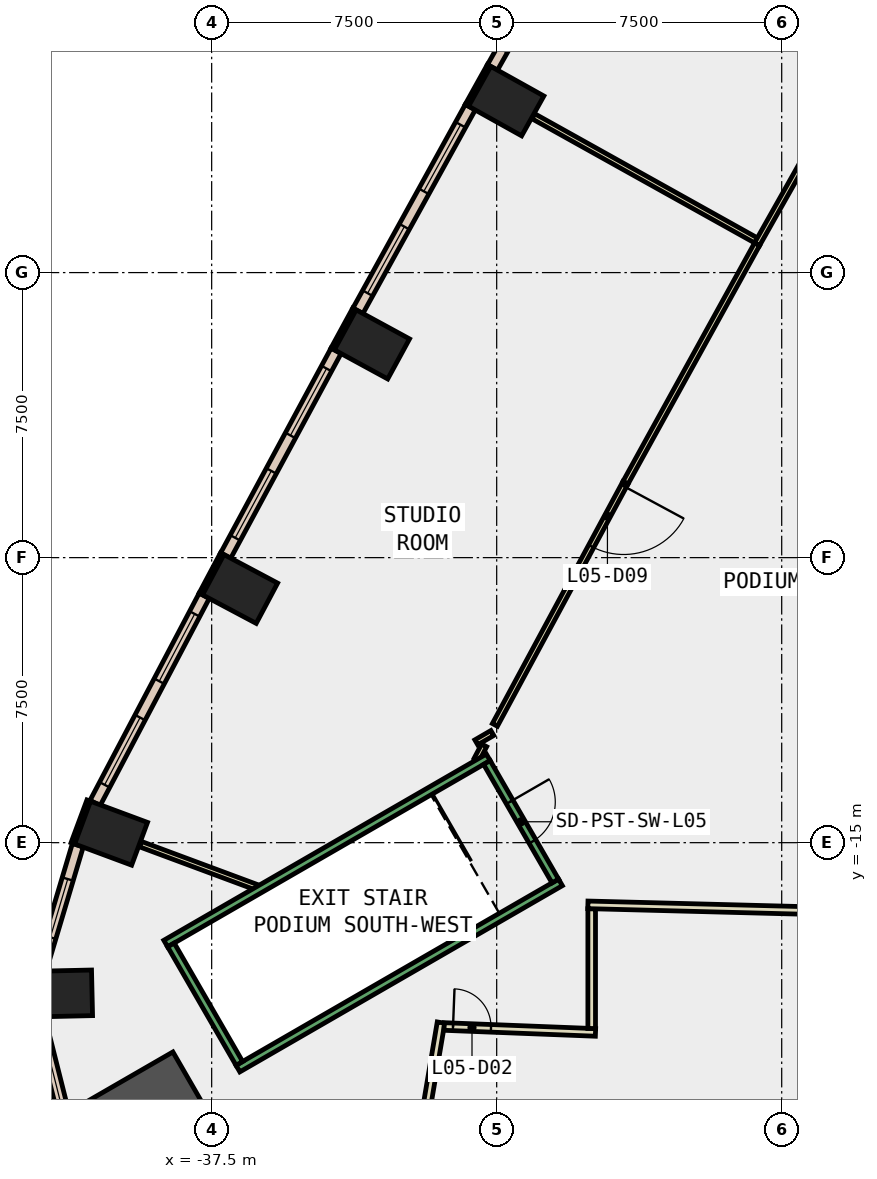
"""IFC4 building model, lengths in metres.
Left out: names, types, materials, properties, quantities, classifications, styles, units other than length and angle.
Written with IfcOpenShell. Run it as: python <this file> out.ifc"""

import sys

from ifc_helpers import new_model, si_unit, direction, frame, frame_2d, origin, origin_2d, place, context, subcontext, project, spatial, rectangle, extrude, element, fill, save


model = new_model("IFC4")
c1 = context("Model", 3, precision=1e-05, world=origin(), true_north=direction((0.0, 1.0)))
c2 = subcontext(c1, "Body", "Model", "MODEL_VIEW")
j1 = project(units=[si_unit("LENGTHUNIT", "METRE"), si_unit("PLANEANGLEUNIT", "RADIAN")], contexts=[c1])
p1 = place(None, origin())
s1 = spatial("IfcSite", under=j1, at=p1, CompositionType="ELEMENT")
p2 = place(p1, origin())
s2 = spatial("IfcBuilding", under=s1, at=p2, CompositionType="ELEMENT")
p3 = place(p2, frame((0.0, 0.0, 30.0)))
s3 = spatial("IfcBuildingStorey", under=s2, at=p3, CompositionType="ELEMENT", Elevation=30.0)
for number, where, z_axis, x_axis in (
    (1, (-29.75, 4.512, -0.45), (0.0, 0.0, 1.0), (0.487, 0.873, 0.0)),
    (2, (-33.283, -1.889, -0.45), (0.0, 0.0, 1.0), (0.478, 0.878, 0.0)),
    (3, (-36.753, -8.325, -0.45), (0.0, 0.0, 1.0), (0.469, 0.883, 0.0)),
    (4, (-40.147, -14.751, -0.45), (0.0, 0.0, 1.0), (0.348, 0.937, 0.0)),
    (5, (-41.448, -18.969, -0.45), (0.0, 0.0, 1.0), (-0.023, 1.0, 0.0)),
):
    element("IfcColumn", number, at=place(p3, frame(where, z_axis=z_axis, x_axis=x_axis)), inside=s3, PredefinedType="COLUMN", context=c2, shape_type="SweptSolid", body=[
        extrude(rectangle(XDim=1.2, YDim=1.6, at=origin_2d()), origin(), (0.0, 0.0, 1.0), 4.85),
    ])
p4 = place(p3, frame((-39.069, -22.556, -0.45), z_axis=(0.0, 0.0, 1.0), x_axis=(0.866025403784, 0.5, 0.0)))
e6 = element("IfcColumn", 6, at=p4, inside=s3, PredefinedType="COLUMN", context=c2, shape_type="SweptSolid", body=[
    extrude(rectangle(XDim=3.0, YDim=3.0, at=origin_2d()), origin(), (0.0, 0.0, 1.0), 4.85),
])
p5 = place(p3, frame((-30.2, 5.45, 0.0), z_axis=(0.0, 0.0, 1.0), x_axis=(-0.486817526853, -0.873503689488, 0.0)))
e7 = element("IfcWall", 7, at=p5, inside=s3, PredefinedType="STANDARD", context=c2, shape_type="SweptSolid", body=[
    extrude(rectangle(XDim=1.2, YDim=0.1, at=frame_2d((0.6, 0.0))), origin(), (0.0, 0.0, 1.0), 4.4),
])
p6 = place(p3, frame((-33.742, -0.956, 0.0), z_axis=(0.0, 0.0, 1.0), x_axis=(-0.478267644701, -0.878214131082, 0.0)))
e8 = element("IfcWall", 8, at=p6, inside=s3, PredefinedType="STANDARD", context=c2, shape_type="SweptSolid", body=[
    extrude(rectangle(XDim=1.2, YDim=0.1, at=frame_2d((0.6, 0.0))), origin(), (0.0, 0.0, 1.0), 4.4),
])
p7 = place(p3, frame((-37.222, -7.397, 0.0), z_axis=(0.0, 0.0, 1.0), x_axis=(-0.469383408131, -0.882994459876, 0.0)))
e9 = element("IfcWall", 9, at=p7, inside=s3, PredefinedType="STANDARD", context=c2, shape_type="SweptSolid", body=[
    extrude(rectangle(XDim=1.199, YDim=0.1, at=frame_2d((0.6, 0.0))), origin(), (0.0, 0.0, 1.0), 4.4),
])
p8 = place(p3, frame((-40.735, -13.893, 0.0), z_axis=(0.0, 0.0, 1.0), x_axis=(-0.348268249601, -0.937394914814, 0.0)))
e10 = element("IfcWall", 10, at=p8, inside=s3, PredefinedType="STANDARD", context=c2, shape_type="SweptSolid", body=[
    extrude(rectangle(XDim=1.2, YDim=0.1, at=frame_2d((0.6, 0.0))), origin(), (0.0, 0.0, 1.0), 4.4),
])
p9 = place(p3, frame((-27.101, 10.73, 0.0), z_axis=(0.0, 0.0, 1.0), x_axis=(-0.491661677717, -0.870786308267, 0.0)))
e11 = element("IfcWall", 11, at=p9, inside=s3, PredefinedType="STANDARD", context=c2, shape_type="SweptSolid", body=[
    extrude(rectangle(XDim=6.122, YDim=0.3, at=frame_2d((3.061, 0.0))), origin(), (0.0, 0.0, 1.0), 4.4),
])
p10 = place(p9, frame((0.531, 0.0, 1.0)))
e12 = element("IfcOpeningElement", 12, at=p10, cuts=e11, PredefinedType="OPENING", context=c2, shape_type="SweptSolid", body=[
    extrude(rectangle(XDim=2.0, YDim=3.2, at=frame_2d((1.0, 1.6))), frame((0.0, 0.16, 0.0), z_axis=(0.0, -1.0, 0.0), x_axis=(1.0, 0.0, 0.0)), (0.0, 0.0, 1.0), 0.32),
])
p11 = place(p9, frame((3.592, 0.0, 1.0)))
e13 = element("IfcOpeningElement", 13, at=p11, cuts=e11, PredefinedType="OPENING", context=c2, shape_type="SweptSolid", body=[
    extrude(rectangle(XDim=2.0, YDim=3.2, at=frame_2d((1.0, 1.6))), frame((0.0, 0.16, 0.0), z_axis=(0.0, -1.0, 0.0), x_axis=(1.0, 0.0, 0.0)), (0.0, 0.0, 1.0), 0.32),
])
p12 = place(p3, frame((-30.694, 4.353, 0.0), z_axis=(0.0, 0.0, 1.0), x_axis=(-0.483233380559, -0.875491576152, 0.0)))
e14 = element("IfcWall", 14, at=p12, inside=s3, PredefinedType="STANDARD", context=c2, shape_type="SweptSolid", body=[
    extrude(rectangle(XDim=6.121, YDim=0.3, at=frame_2d((3.061, 0.0))), origin(), (0.0, 0.0, 1.0), 4.4),
])
p13 = place(p12, frame((0.53, 0.0, 1.0)))
e15 = element("IfcOpeningElement", 15, at=p13, cuts=e14, PredefinedType="OPENING", context=c2, shape_type="SweptSolid", body=[
    extrude(rectangle(XDim=2.0, YDim=3.2, at=frame_2d((1.0, 1.6))), frame((0.0, 0.16, 0.0), z_axis=(0.0, -1.0, 0.0), x_axis=(1.0, 0.0, 0.0)), (0.0, 0.0, 1.0), 0.32),
])
p14 = place(p12, frame((3.591, 0.0, 1.0)))
e16 = element("IfcOpeningElement", 16, at=p14, cuts=e14, PredefinedType="OPENING", context=c2, shape_type="SweptSolid", body=[
    extrude(rectangle(XDim=2.0, YDim=3.2, at=frame_2d((1.0, 1.6))), frame((0.0, 0.16, 0.0), z_axis=(0.0, -1.0, 0.0), x_axis=(1.0, 0.0, 0.0)), (0.0, 0.0, 1.0), 0.32),
])
p15 = place(p3, frame((-34.226, -2.058, 0.0), z_axis=(0.0, 0.0, 1.0), x_axis=(-0.474584950749, -0.880209704856, 0.0)))
e17 = element("IfcWall", 17, at=p15, inside=s3, PredefinedType="STANDARD", context=c2, shape_type="SweptSolid", body=[
    extrude(rectangle(XDim=6.121, YDim=0.3, at=frame_2d((3.061, 0.0))), origin(), (0.0, 0.0, 1.0), 4.4),
])
p16 = place(p15, frame((0.53, 0.0, 1.0)))
e18 = element("IfcOpeningElement", 18, at=p16, cuts=e17, PredefinedType="OPENING", context=c2, shape_type="SweptSolid", body=[
    extrude(rectangle(XDim=2.0, YDim=3.2, at=frame_2d((1.0, 1.6))), frame((0.0, 0.16, 0.0), z_axis=(0.0, -1.0, 0.0), x_axis=(1.0, 0.0, 0.0)), (0.0, 0.0, 1.0), 0.32),
])
p17 = place(p15, frame((3.591, 0.0, 1.0)))
e19 = element("IfcOpeningElement", 19, at=p17, cuts=e17, PredefinedType="OPENING", context=c2, shape_type="SweptSolid", body=[
    extrude(rectangle(XDim=2.0, YDim=3.2, at=frame_2d((1.0, 1.6))), frame((0.0, 0.16, 0.0), z_axis=(0.0, -1.0, 0.0), x_axis=(1.0, 0.0, 0.0)), (0.0, 0.0, 1.0), 0.32),
])
p18 = place(p3, frame((-37.695, -8.503, 0.0), z_axis=(0.0, 0.0, 1.0), x_axis=(-0.466125129602, -0.884718804792, 0.0)))
e20 = element("IfcWall", 20, at=p18, inside=s3, PredefinedType="STANDARD", context=c2, shape_type="SweptSolid", body=[
    extrude(rectangle(XDim=6.164, YDim=0.3, at=frame_2d((3.082, 0.0))), origin(), (0.0, 0.0, 1.0), 4.4),
])
p19 = place(p18, frame((0.541, 0.0, 1.0)))
e21 = element("IfcOpeningElement", 21, at=p19, cuts=e20, PredefinedType="OPENING", context=c2, shape_type="SweptSolid", body=[
    extrude(rectangle(XDim=2.0, YDim=3.2, at=frame_2d((1.0, 1.6))), frame((0.0, 0.16, 0.0), z_axis=(0.0, -1.0, 0.0), x_axis=(1.0, 0.0, 0.0)), (0.0, 0.0, 1.0), 0.32),
])
p20 = place(p18, frame((3.623, 0.0, 1.0)))
e22 = element("IfcOpeningElement", 22, at=p20, cuts=e20, PredefinedType="OPENING", context=c2, shape_type="SweptSolid", body=[
    extrude(rectangle(XDim=2.0, YDim=3.2, at=frame_2d((1.0, 1.6))), frame((0.0, 0.16, 0.0), z_axis=(0.0, -1.0, 0.0), x_axis=(1.0, 0.0, 0.0)), (0.0, 0.0, 1.0), 0.32),
])
p21 = place(p3, frame((-41.022, -15.066, 0.0), z_axis=(0.0, 0.0, 1.0), x_axis=(-0.285800575124, -0.958289116738, 0.0)))
e23 = element("IfcWall", 23, at=p21, inside=s3, PredefinedType="STANDARD", context=c2, shape_type="SweptSolid", body=[
    extrude(rectangle(XDim=3.46, YDim=0.3, at=frame_2d((1.73, 0.0))), origin(), (0.0, 0.0, 1.0), 4.4),
])
p22 = place(p21, frame((0.93, 0.0, 1.0)))
e24 = element("IfcOpeningElement", 24, at=p22, cuts=e23, PredefinedType="OPENING", context=c2, shape_type="SweptSolid", body=[
    extrude(rectangle(XDim=1.6, YDim=3.2, at=frame_2d((0.8, 1.6))), frame((0.0, 0.16, 0.0), z_axis=(0.0, -1.0, 0.0), x_axis=(1.0, 0.0, 0.0)), (0.0, 0.0, 1.0), 0.32),
])
p23 = place(p3, frame((-42.044, -19.581, 0.0), z_axis=(0.0, 0.0, 1.0), x_axis=(0.244315836028, -0.969695711172, 0.0)))
e25 = element("IfcWall", 25, at=p23, inside=s3, PredefinedType="STANDARD", context=c2, shape_type="SweptSolid", body=[
    extrude(rectangle(XDim=3.291, YDim=0.3, at=frame_2d((1.645, 0.0))), origin(), (0.0, 0.0, 1.0), 4.4),
])
p24 = place(p23, frame((0.845, 0.0, 1.0)))
e26 = element("IfcOpeningElement", 26, at=p24, cuts=e25, PredefinedType="OPENING", context=c2, shape_type="SweptSolid", body=[
    extrude(rectangle(XDim=1.6, YDim=3.2, at=frame_2d((0.8, 1.6))), frame((0.0, 0.16, 0.0), z_axis=(0.0, -1.0, 0.0), x_axis=(1.0, 0.0, 0.0)), (0.0, 0.0, 1.0), 0.32),
])
p25 = place(p3, frame((-32.625, -26.588, 0.0), z_axis=(0.0, 0.0, 1.0), x_axis=(0.166858828969, 0.985980796565, 0.0)))
e27 = element("IfcWall", 27, at=p25, inside=s3, PredefinedType="PARTITIONING", context=c2, shape_type="SweptSolid", body=[
    extrude(rectangle(XDim=6.951, YDim=0.2, at=frame_2d((3.476, 0.0))), origin(), (0.0, 0.0, 1.0), 4.4),
])
p26 = place(p3, frame((-31.382, -19.837, 0.0), z_axis=(0.0, 0.0, 1.0), x_axis=(0.999233502058, -0.03914598785, 0.0)))
e28 = element("IfcWall", 28, at=p26, inside=s3, PredefinedType="PARTITIONING", context=c2, shape_type="SweptSolid", body=[
    extrude(rectangle(XDim=3.985, YDim=0.2, at=frame_2d((1.993, 0.0))), origin(), (0.0, 0.0, 1.0), 4.4),
])
p27 = place(p26, frame((0.233, 0.0, 0.0)))
e29 = element("IfcOpeningElement", 29, at=p27, cuts=e28, PredefinedType="OPENING", context=c2, shape_type="SweptSolid", body=[
    extrude(rectangle(XDim=1.0, YDim=2.1, at=frame_2d((0.5, 1.05))), frame((0.0, 0.11, 0.0), z_axis=(0.0, -1.0, 0.0), x_axis=(1.0, 0.0, 0.0)), (0.0, 0.0, 1.0), 0.22),
])
p28 = place(p3, frame((-27.5, -19.889, 0.0), z_axis=(0.0, 0.0, 1.0), x_axis=(0.0, 1.0, 0.0)))
e30 = element("IfcWall", 30, at=p28, inside=s3, PredefinedType="PARTITIONING", context=c2, shape_type="SweptSolid", body=[
    extrude(rectangle(XDim=3.15, YDim=0.2, at=frame_2d((1.575, 0.0))), origin(), (0.0, 0.0, 1.0), 4.4),
])
p29 = place(p3, frame((-27.6, -16.636, 0.0), z_axis=(0.0, 0.0, 1.0), x_axis=(0.999664659407, -0.025895341927, 0.0)))
e31 = element("IfcWall", 31, at=p29, inside=s3, PredefinedType="PARTITIONING", context=c2, shape_type="SweptSolid", body=[
    extrude(rectangle(XDim=8.881, YDim=0.2, at=frame_2d((4.44, 0.0))), origin(), (0.0, 0.0, 1.0), 4.4),
])
p30 = place(p3, frame((-23.112, 0.811, 0.0), z_axis=(0.0, 0.0, 1.0), x_axis=(-0.873400397497, 0.487002818937, 0.0)))
e32 = element("IfcWall", 32, at=p30, inside=s3, PredefinedType="PARTITIONING", context=c2, shape_type="SweptSolid", body=[
    extrude(rectangle(XDim=6.78, YDim=0.15, at=frame_2d((3.39, 0.0))), origin(), (0.0, 0.0, 1.0), 4.4),
])
p31 = place(p3, frame((-19.555, 7.112, 0.0), z_axis=(0.0, 0.0, 1.0), x_axis=(-0.491625820386, -0.87080655299, 0.0)))
e33 = element("IfcWall", 33, at=p31, inside=s3, PredefinedType="PARTITIONING", context=c2, shape_type="SweptSolid", body=[
    extrude(rectangle(XDim=7.311, YDim=0.15, at=frame_2d((3.655, 0.0))), origin(), (0.0, 0.0, 1.0), 4.4),
])
p32 = place(p3, frame((-23.148, 0.746, 0.0), z_axis=(0.0, 0.0, 1.0), x_axis=(-0.483125061868, -0.875551354631, 0.0)))
e34 = element("IfcWall", 34, at=p32, inside=s3, PredefinedType="PARTITIONING", context=c2, shape_type="SweptSolid", body=[
    extrude(rectangle(XDim=7.168, YDim=0.15, at=frame_2d((3.584, 0.0))), origin(), (0.0, 0.0, 1.0), 4.4),
])
p33 = place(p3, frame((-26.611, -5.53, 0.0), z_axis=(0.0, 0.0, 1.0), x_axis=(-0.474697082426, -0.88014923731, 0.0)))
e35 = element("IfcWall", 35, at=p33, inside=s3, PredefinedType="PARTITIONING", context=c2, shape_type="SweptSolid", body=[
    extrude(rectangle(XDim=7.238, YDim=0.15, at=frame_2d((3.619, 0.0))), origin(), (0.0, 0.0, 1.0), 4.4),
])
p34 = place(p33, frame((0.1, 0.0, 0.0)))
e36 = element("IfcOpeningElement", 36, at=p34, cuts=e35, PredefinedType="OPENING", context=c2, shape_type="SweptSolid", body=[
    extrude(rectangle(XDim=1.8, YDim=2.1, at=frame_2d((0.9, 1.05))), frame((0.0, 0.085, 0.0), z_axis=(0.0, -1.0, 0.0), x_axis=(1.0, 0.0, 0.0)), (0.0, 0.0, 1.0), 0.17),
])
p35 = place(p3, frame((-30.115, -12.115, 0.0), z_axis=(0.0, 0.0, 1.0), x_axis=(-0.864774934036, -0.502159649377, 0.0)))
e37 = element("IfcWall", 37, at=p35, inside=s3, PredefinedType="PARTITIONING", context=c2, shape_type="SweptSolid", body=[
    extrude(rectangle(XDim=0.488, YDim=0.15, at=frame_2d((0.244, 0.0))), origin(), (0.0, 0.0, 1.0), 4.4),
])
p36 = place(p3, frame((-30.33, -12.44, 0.0), z_axis=(0.0, 0.0, 1.0), x_axis=(-0.465959538506, -0.884806028729, 0.0)))
e38 = element("IfcWall", 38, at=p36, inside=s3, PredefinedType="PARTITIONING", context=c2, shape_type="SweptSolid", body=[
    extrude(rectangle(XDim=0.425, YDim=0.15, at=frame_2d((0.212, 0.0))), origin(), (0.0, 0.0, 1.0), 4.4),
])
p37 = place(p3, frame((-36.334, -16.168, 0.0), z_axis=(0.0, 0.0, 1.0), x_axis=(-0.937400028274, 0.348254485961, 0.0)))
e39 = element("IfcWall", 39, at=p37, inside=s3, PredefinedType="PARTITIONING", context=c2, shape_type="SweptSolid", body=[
    extrude(rectangle(XDim=3.247, YDim=0.15, at=frame_2d((1.624, 0.0))), origin(), (0.0, 0.0, 1.0), 4.4),
])
for number, where, z_axis, x_axis in (
    (40, (-30.222, -12.755, 0.0), (0.0, 0.0, 1.0), (-0.866, -0.5, 0.0)),
    (41, (-28.322, -16.045, 0.0), (0.0, 0.0, 1.0), (-0.866, -0.5, 0.0)),
):
    element("IfcWall", number, at=place(p3, frame(where, z_axis=z_axis, x_axis=x_axis)), inside=s3, PredefinedType="STANDARD", context=c2, shape_type="SweptSolid", body=[
        extrude(rectangle(XDim=9.8, YDim=0.2, at=frame_2d((4.9, 0.0))), origin(), (0.0, 0.0, 1.0), 3.2),
    ])
p38 = place(p3, frame((-30.258, -12.891, 0.0), z_axis=(0.0, 0.0, 1.0), x_axis=(0.499982693035, -0.866035395735, 0.0)))
e42 = element("IfcWall", 42, at=p38, inside=s3, PredefinedType="STANDARD", context=c2, shape_type="SweptSolid", body=[
    extrude(rectangle(XDim=3.6, YDim=0.2, at=frame_2d((1.8, 0.0))), origin(), (0.0, 0.0, 1.0), 3.2),
])
p39 = place(p38, frame((1.2, 0.0, 0.0)))
e43 = element("IfcOpeningElement", 43, at=p39, cuts=e42, PredefinedType="OPENING", context=c2, shape_type="SweptSolid", body=[
    extrude(rectangle(XDim=1.2, YDim=2.2, at=frame_2d((0.6, 1.1))), frame((0.0, 0.11, 0.0), z_axis=(0.0, -1.0, 0.0), x_axis=(1.0, 0.0, 0.0)), (0.0, 0.0, 1.0), 0.22),
])
p40 = place(p3, frame((-38.572, -17.691, 0.0), z_axis=(0.0, 0.0, 1.0), x_axis=(0.49995333141, -0.866052346231, 0.0)))
e44 = element("IfcWall", 44, at=p40, inside=s3, PredefinedType="STANDARD", context=c2, shape_type="SweptSolid", body=[
    extrude(rectangle(XDim=3.6, YDim=0.2, at=frame_2d((1.8, 0.0))), origin(), (0.0, 0.0, 1.0), 3.2),
])
p41 = place(p13, origin())
e45 = element("IfcWindow", 45, at=p41, inside=s3, PartitioningType="SINGLE_PANEL", PredefinedType="WINDOW", context=c2, shape_type="SweptSolid", body=[
    extrude(rectangle(XDim=2.0, YDim=3.2, at=frame_2d((1.0, 1.6))), frame((0.0, 0.03, 0.0), z_axis=(0.0, -1.0, 0.0), x_axis=(1.0, 0.0, 0.0)), (0.0, 0.0, 1.0), 0.06),
])
fill(e15, e45)
p42 = place(p14, origin())
e46 = element("IfcWindow", 46, at=p42, inside=s3, PartitioningType="SINGLE_PANEL", PredefinedType="WINDOW", context=c2, shape_type="SweptSolid", body=[
    extrude(rectangle(XDim=2.0, YDim=3.2, at=frame_2d((1.0, 1.6))), frame((0.0, 0.03, 0.0), z_axis=(0.0, -1.0, 0.0), x_axis=(1.0, 0.0, 0.0)), (0.0, 0.0, 1.0), 0.06),
])
fill(e16, e46)
p43 = place(p16, origin())
e47 = element("IfcWindow", 47, at=p43, inside=s3, PartitioningType="SINGLE_PANEL", PredefinedType="WINDOW", context=c2, shape_type="SweptSolid", body=[
    extrude(rectangle(XDim=2.0, YDim=3.2, at=frame_2d((1.0, 1.6))), frame((0.0, 0.03, 0.0), z_axis=(0.0, -1.0, 0.0), x_axis=(1.0, 0.0, 0.0)), (0.0, 0.0, 1.0), 0.06),
])
fill(e18, e47)
p44 = place(p17, origin())
e48 = element("IfcWindow", 48, at=p44, inside=s3, PartitioningType="SINGLE_PANEL", PredefinedType="WINDOW", context=c2, shape_type="SweptSolid", body=[
    extrude(rectangle(XDim=2.0, YDim=3.2, at=frame_2d((1.0, 1.6))), frame((0.0, 0.03, 0.0), z_axis=(0.0, -1.0, 0.0), x_axis=(1.0, 0.0, 0.0)), (0.0, 0.0, 1.0), 0.06),
])
fill(e19, e48)
p45 = place(p19, origin())
e49 = element("IfcWindow", 49, at=p45, inside=s3, PartitioningType="SINGLE_PANEL", PredefinedType="WINDOW", context=c2, shape_type="SweptSolid", body=[
    extrude(rectangle(XDim=2.0, YDim=3.2, at=frame_2d((1.0, 1.6))), frame((0.0, 0.03, 0.0), z_axis=(0.0, -1.0, 0.0), x_axis=(1.0, 0.0, 0.0)), (0.0, 0.0, 1.0), 0.06),
])
fill(e21, e49)
p46 = place(p20, origin())
e50 = element("IfcWindow", 50, at=p46, inside=s3, PartitioningType="SINGLE_PANEL", PredefinedType="WINDOW", context=c2, shape_type="SweptSolid", body=[
    extrude(rectangle(XDim=2.0, YDim=3.2, at=frame_2d((1.0, 1.6))), frame((0.0, 0.03, 0.0), z_axis=(0.0, -1.0, 0.0), x_axis=(1.0, 0.0, 0.0)), (0.0, 0.0, 1.0), 0.06),
])
fill(e22, e50)
p47 = place(p22, origin())
e51 = element("IfcWindow", 51, at=p47, inside=s3, PartitioningType="SINGLE_PANEL", PredefinedType="WINDOW", context=c2, shape_type="SweptSolid", body=[
    extrude(rectangle(XDim=1.6, YDim=3.2, at=frame_2d((0.8, 1.6))), frame((0.0, 0.03, 0.0), z_axis=(0.0, -1.0, 0.0), x_axis=(1.0, 0.0, 0.0)), (0.0, 0.0, 1.0), 0.06),
])
fill(e24, e51)
p48 = place(p24, origin())
e52 = element("IfcWindow", 52, at=p48, inside=s3, PartitioningType="SINGLE_PANEL", PredefinedType="WINDOW", context=c2, shape_type="SweptSolid", body=[
    extrude(rectangle(XDim=1.6, YDim=3.2, at=frame_2d((0.8, 1.6))), frame((0.0, 0.03, 0.0), z_axis=(0.0, -1.0, 0.0), x_axis=(1.0, 0.0, 0.0)), (0.0, 0.0, 1.0), 0.06),
])
fill(e26, e52)
p49 = place(p27, origin())
e53 = element("IfcDoor", 53, at=p49, inside=s3, OperationType="SINGLE_SWING_LEFT", PredefinedType="DOOR", context=c2, shape_type="SweptSolid", body=[
    extrude(rectangle(XDim=1.0, YDim=2.1, at=frame_2d((0.5, 1.05))), frame((0.0, 0.025, 0.0), z_axis=(0.0, -1.0, 0.0), x_axis=(1.0, 0.0, 0.0)), (0.0, 0.0, 1.0), 0.05),
])
fill(e29, e53)
p50 = place(p34, origin())
e54 = element("IfcDoor", 54, at=p50, inside=s3, OperationType="DOUBLE_DOOR_SINGLE_SWING", PredefinedType="DOOR", context=c2, shape_type="SweptSolid", body=[
    extrude(rectangle(XDim=1.8, YDim=2.1, at=frame_2d((0.9, 1.05))), frame((0.0, 0.025, 0.0), z_axis=(0.0, -1.0, 0.0), x_axis=(1.0, 0.0, 0.0)), (0.0, 0.0, 1.0), 0.05),
])
fill(e36, e54)
p51 = place(p39, origin())
e55 = element("IfcDoor", 55, at=p51, inside=s3, OperationType="SINGLE_SWING_LEFT", PredefinedType="DOOR", context=c2, shape_type="SweptSolid", body=[
    extrude(rectangle(XDim=1.2, YDim=2.2, at=frame_2d((0.6, 1.1))), frame((0.0, 0.025, 0.0), z_axis=(0.0, -1.0, 0.0), x_axis=(1.0, 0.0, 0.0)), (0.0, 0.0, 1.0), 0.05),
])
fill(e43, e55)
save(model, sys.argv[1])
